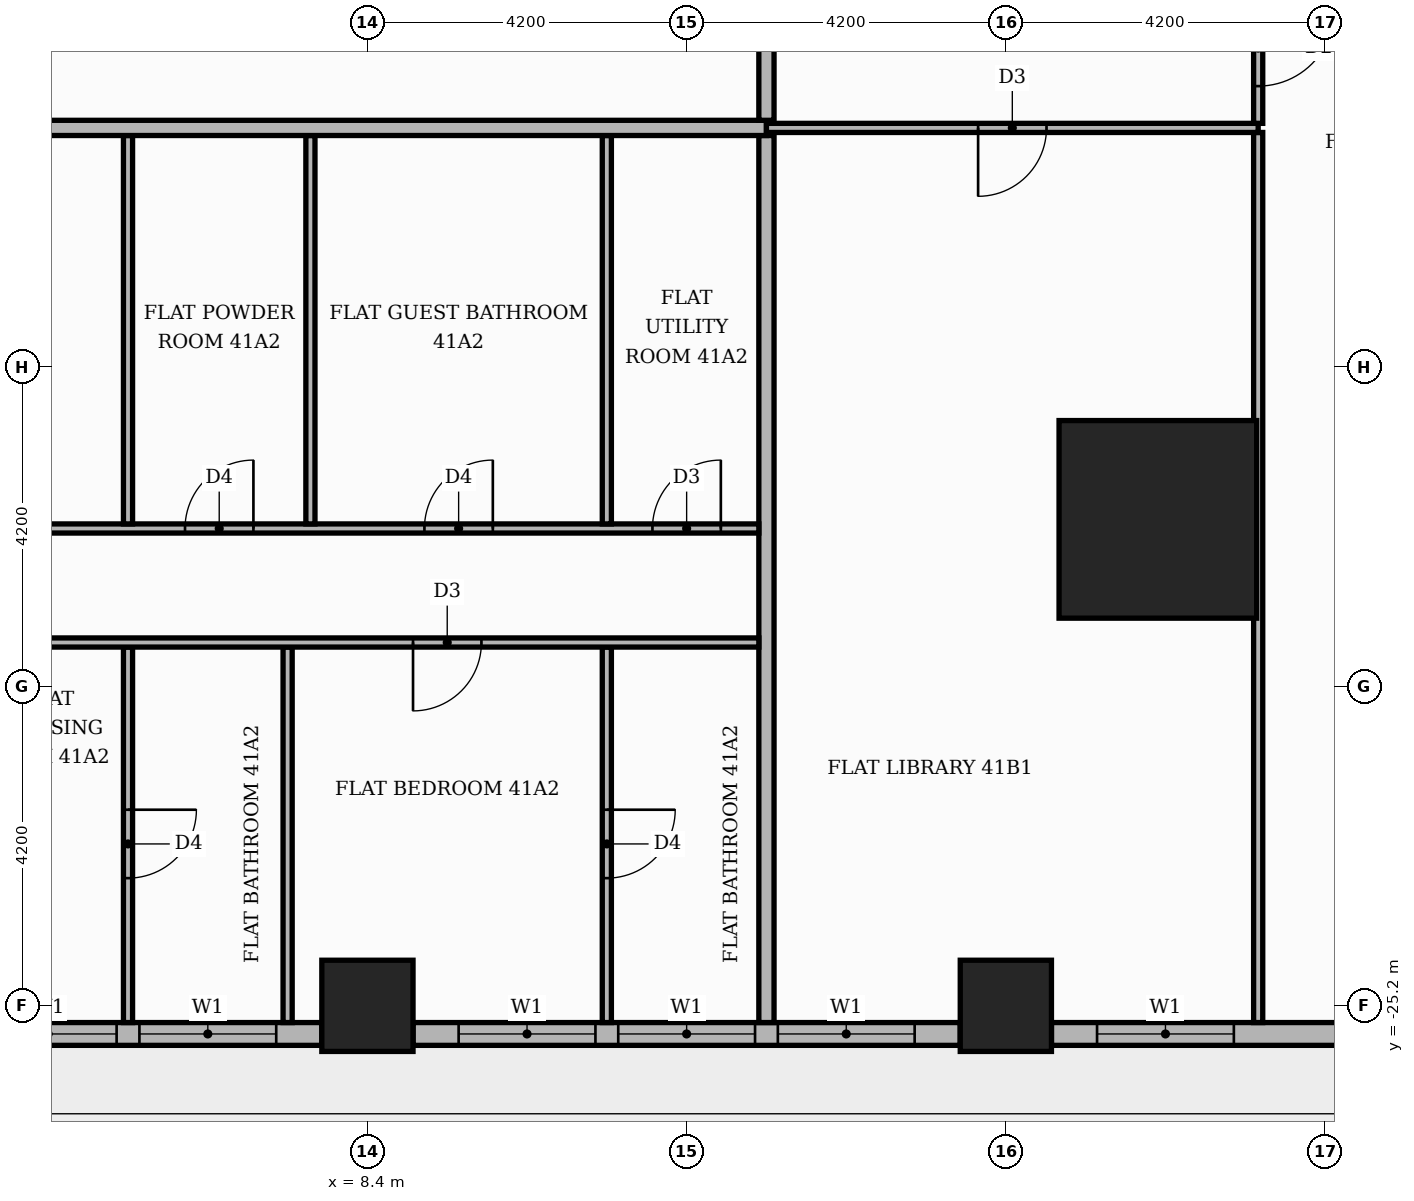
"""IFC4 building model, lengths in metres.
Left out: names, types, materials, properties, quantities, classifications, styles, units other than length and angle.
Written with IfcOpenShell. Run it as: python <this file> out.ifc"""

import sys

from ifc_helpers import new_model, si_unit, direction, frame, frame_2d, origin, origin_2d, place, context, subcontext, project, spatial, rectangle, extrude, element, fill, save


model = new_model("IFC4")
c1 = context("Model", 3, precision=1e-05, world=origin(), true_north=direction((0.0, 1.0)))
c2 = subcontext(c1, "Body", "Model", "MODEL_VIEW")
j1 = project(units=[si_unit("LENGTHUNIT", "METRE"), si_unit("PLANEANGLEUNIT", "RADIAN")], contexts=[c1])
p1 = place(None, origin())
s1 = spatial("IfcSite", under=j1, at=p1, CompositionType="ELEMENT")
p2 = place(p1, origin())
s2 = spatial("IfcBuilding", under=s1, at=p2, CompositionType="ELEMENT")
p3 = place(p2, frame((0.0, 0.0, 172.8)))
s3 = spatial("IfcBuildingStorey", under=s2, at=p3, CompositionType="ELEMENT", Elevation=172.8)
p4 = place(p3, frame((18.8, -18.8, 0.0), z_axis=(0.0, 0.0, 1.0), x_axis=(1.0, 0.0, 0.0)))
e1 = element("IfcColumn", 1, at=p4, inside=s3, PredefinedType="COLUMN", context=c2, shape_type="SweptSolid", body=[
    extrude(rectangle(XDim=2.6, YDim=2.6, at=origin_2d()), origin(), (0.0, 0.0, 1.0), 3.9),
])
for number, where, z_axis, x_axis in (
    (2, (8.4, -25.2, 0.0), (0.0, 0.0, 1.0), (1.0, 0.0, 0.0)),
    (3, (16.8, -25.2, 0.0), (0.0, 0.0, 1.0), (1.0, 0.0, 0.0)),
):
    element("IfcColumn", number, at=place(p3, frame(where, z_axis=z_axis, x_axis=x_axis)), inside=s3, PredefinedType="COLUMN", context=c2, shape_type="SweptSolid", body=[
        extrude(rectangle(XDim=1.2, YDim=1.2, at=origin_2d()), origin(), (0.0, 0.0, 1.0), 3.9),
    ])
p5 = place(p3, frame((0.6, -25.57, 0.0), z_axis=(0.0, 0.0, 1.0), x_axis=(1.0, 0.0, 0.0)))
e4 = element("IfcWall", 4, at=p5, inside=s3, PredefinedType="STANDARD", context=c2, shape_type="SweptSolid", body=[
    extrude(rectangle(XDim=7.2, YDim=0.3, at=frame_2d((3.6, 0.0))), origin(), (0.0, 0.0, 1.0), 3.48),
])
p6 = place(p5, frame((0.6, 0.0, 0.0)))
e5 = element("IfcOpeningElement", 5, at=p6, cuts=e4, PredefinedType="OPENING", context=c2, shape_type="SweptSolid", body=[
    extrude(rectangle(XDim=1.8, YDim=2.4, at=frame_2d((0.9, 1.2))), frame((0.0, 0.16, 0.0), z_axis=(0.0, -1.0, 0.0), x_axis=(1.0, 0.0, 0.0)), (0.0, 0.0, 1.0), 0.32),
])
p7 = place(p5, frame((2.7, 0.0, 0.9)))
e6 = element("IfcOpeningElement", 6, at=p7, cuts=e4, PredefinedType="OPENING", context=c2, shape_type="SweptSolid", body=[
    extrude(rectangle(XDim=1.8, YDim=2.1, at=frame_2d((0.9, 1.05))), frame((0.0, 0.16, 0.0), z_axis=(0.0, -1.0, 0.0), x_axis=(1.0, 0.0, 0.0)), (0.0, 0.0, 1.0), 0.32),
])
p8 = place(p5, frame((4.8, 0.0, 0.9)))
e7 = element("IfcOpeningElement", 7, at=p8, cuts=e4, PredefinedType="OPENING", context=c2, shape_type="SweptSolid", body=[
    extrude(rectangle(XDim=1.8, YDim=2.1, at=frame_2d((0.9, 1.05))), frame((0.0, 0.16, 0.0), z_axis=(0.0, -1.0, 0.0), x_axis=(1.0, 0.0, 0.0)), (0.0, 0.0, 1.0), 0.32),
])
p9 = place(p3, frame((9.0, -25.57, 0.0), z_axis=(0.0, 0.0, 1.0), x_axis=(1.0, 0.0, 0.0)))
e8 = element("IfcWall", 8, at=p9, inside=s3, PredefinedType="STANDARD", context=c2, shape_type="SweptSolid", body=[
    extrude(rectangle(XDim=7.2, YDim=0.3, at=frame_2d((3.6, 0.0))), origin(), (0.0, 0.0, 1.0), 3.48),
])
p10 = place(p9, frame((0.6, 0.0, 0.9)))
e9 = element("IfcOpeningElement", 9, at=p10, cuts=e8, PredefinedType="OPENING", context=c2, shape_type="SweptSolid", body=[
    extrude(rectangle(XDim=1.8, YDim=2.1, at=frame_2d((0.9, 1.05))), frame((0.0, 0.16, 0.0), z_axis=(0.0, -1.0, 0.0), x_axis=(1.0, 0.0, 0.0)), (0.0, 0.0, 1.0), 0.32),
])
p11 = place(p9, frame((2.7, 0.0, 0.9)))
e10 = element("IfcOpeningElement", 10, at=p11, cuts=e8, PredefinedType="OPENING", context=c2, shape_type="SweptSolid", body=[
    extrude(rectangle(XDim=1.8, YDim=2.1, at=frame_2d((0.9, 1.05))), frame((0.0, 0.16, 0.0), z_axis=(0.0, -1.0, 0.0), x_axis=(1.0, 0.0, 0.0)), (0.0, 0.0, 1.0), 0.32),
])
p12 = place(p9, frame((4.8, 0.0, 0.9)))
e11 = element("IfcOpeningElement", 11, at=p12, cuts=e8, PredefinedType="OPENING", context=c2, shape_type="SweptSolid", body=[
    extrude(rectangle(XDim=1.8, YDim=2.1, at=frame_2d((0.9, 1.05))), frame((0.0, 0.16, 0.0), z_axis=(0.0, -1.0, 0.0), x_axis=(1.0, 0.0, 0.0)), (0.0, 0.0, 1.0), 0.32),
])
p13 = place(p3, frame((17.4, -25.57, 0.0), z_axis=(0.0, 0.0, 1.0), x_axis=(1.0, 0.0, 0.0)))
e12 = element("IfcWall", 12, at=p13, inside=s3, PredefinedType="STANDARD", context=c2, shape_type="SweptSolid", body=[
    extrude(rectangle(XDim=4.32, YDim=0.3, at=frame_2d((2.16, 0.0))), origin(), (0.0, 0.0, 1.0), 3.48),
])
p14 = place(p13, frame((0.6, 0.0, 0.9)))
e13 = element("IfcOpeningElement", 13, at=p14, cuts=e12, PredefinedType="OPENING", context=c2, shape_type="SweptSolid", body=[
    extrude(rectangle(XDim=1.8, YDim=2.1, at=frame_2d((0.9, 1.05))), frame((0.0, 0.16, 0.0), z_axis=(0.0, -1.0, 0.0), x_axis=(1.0, 0.0, 0.0)), (0.0, 0.0, 1.0), 0.32),
])
p15 = place(p3, frame((5.25, -25.42, 0.0), z_axis=(0.0, 0.0, 1.0), x_axis=(0.0, 1.0, 0.0)))
e14 = element("IfcWall", 14, at=p15, inside=s3, PredefinedType="PARTITIONING", context=c2, shape_type="SweptSolid", body=[
    extrude(rectangle(XDim=4.94, YDim=0.12, at=frame_2d((2.47, 0.0))), origin(), (0.0, 0.0, 1.0), 3.48),
])
p16 = place(p15, frame((1.9, 0.0, 0.0)))
e15 = element("IfcOpeningElement", 15, at=p16, cuts=e14, PredefinedType="OPENING", context=c2, shape_type="SweptSolid", body=[
    extrude(rectangle(XDim=0.9, YDim=2.1, at=frame_2d((0.45, 1.05))), frame((0.0, 0.07, 0.0), z_axis=(0.0, -1.0, 0.0), x_axis=(1.0, 0.0, 0.0)), (0.0, 0.0, 1.0), 0.14),
])
p17 = place(p3, frame((7.35, -25.42, 0.0), z_axis=(0.0, 0.0, 1.0), x_axis=(0.0, 1.0, 0.0)))
e16 = element("IfcWall", 16, at=p17, inside=s3, PredefinedType="PARTITIONING", context=c2, shape_type="SweptSolid", body=[
    extrude(rectangle(XDim=4.94, YDim=0.12, at=frame_2d((2.47, 0.0))), origin(), (0.0, 0.0, 1.0), 3.48),
])
p18 = place(p3, frame((11.55, -25.42, 0.0), z_axis=(0.0, 0.0, 1.0), x_axis=(0.0, 1.0, 0.0)))
e17 = element("IfcWall", 17, at=p18, inside=s3, PredefinedType="PARTITIONING", context=c2, shape_type="SweptSolid", body=[
    extrude(rectangle(XDim=4.94, YDim=0.12, at=frame_2d((2.47, 0.0))), origin(), (0.0, 0.0, 1.0), 3.48),
])
p19 = place(p18, frame((1.9, 0.0, 0.0)))
e18 = element("IfcOpeningElement", 18, at=p19, cuts=e17, PredefinedType="OPENING", context=c2, shape_type="SweptSolid", body=[
    extrude(rectangle(XDim=0.9, YDim=2.1, at=frame_2d((0.45, 1.05))), frame((0.0, 0.07, 0.0), z_axis=(0.0, -1.0, 0.0), x_axis=(1.0, 0.0, 0.0)), (0.0, 0.0, 1.0), 0.14),
])
p20 = place(p3, frame((13.65, -25.42, 0.0), z_axis=(0.0, 0.0, 1.0), x_axis=(0.0, 1.0, 0.0)))
e19 = element("IfcWall", 19, at=p20, inside=s3, PredefinedType="PARTITIONING", context=c2, shape_type="SweptSolid", body=[
    extrude(rectangle(XDim=11.67, YDim=0.2, at=frame_2d((5.835, 0.0))), origin(), (0.0, 0.0, 1.0), 3.48),
])
p21 = place(p3, frame((20.12, -25.42, 0.0), z_axis=(0.0, 0.0, 1.0), x_axis=(0.0, 1.0, 0.0)))
e20 = element("IfcWall", 20, at=p21, inside=s3, PredefinedType="PARTITIONING", context=c2, shape_type="SweptSolid", body=[
    extrude(rectangle(XDim=11.71, YDim=0.12, at=frame_2d((5.855, 0.0))), origin(), (0.0, 0.0, 1.0), 3.48),
])
p22 = place(p3, frame((-5.15, -20.42, 0.0), z_axis=(0.0, 0.0, 1.0), x_axis=(1.0, 0.0, 0.0)))
e21 = element("IfcWall", 21, at=p22, inside=s3, PredefinedType="PARTITIONING", context=c2, shape_type="SweptSolid", body=[
    extrude(rectangle(XDim=18.7, YDim=0.12, at=frame_2d((9.35, 0.0))), origin(), (0.0, 0.0, 1.0), 3.48),
])
p23 = place(p22, frame((1.5, 0.0, 0.0)))
e22 = element("IfcOpeningElement", 22, at=p23, cuts=e21, PredefinedType="OPENING", context=c2, shape_type="SweptSolid", body=[
    extrude(rectangle(XDim=1.0, YDim=2.1, at=frame_2d((0.5, 1.05))), frame((0.0, 0.07, 0.0), z_axis=(0.0, -1.0, 0.0), x_axis=(1.0, 0.0, 0.0)), (0.0, 0.0, 1.0), 0.14),
])
p24 = place(p22, frame((5.75, 0.0, 0.0)))
e23 = element("IfcOpeningElement", 23, at=p24, cuts=e21, PredefinedType="OPENING", context=c2, shape_type="SweptSolid", body=[
    extrude(rectangle(XDim=0.9, YDim=2.1, at=frame_2d((0.45, 1.05))), frame((0.0, 0.07, 0.0), z_axis=(0.0, -1.0, 0.0), x_axis=(1.0, 0.0, 0.0)), (0.0, 0.0, 1.0), 0.14),
])
p25 = place(p22, frame((14.15, 0.0, 0.0)))
e24 = element("IfcOpeningElement", 24, at=p25, cuts=e21, PredefinedType="OPENING", context=c2, shape_type="SweptSolid", body=[
    extrude(rectangle(XDim=0.9, YDim=2.1, at=frame_2d((0.45, 1.05))), frame((0.0, 0.07, 0.0), z_axis=(0.0, -1.0, 0.0), x_axis=(1.0, 0.0, 0.0)), (0.0, 0.0, 1.0), 0.14),
])
p26 = place(p3, frame((-1.05, -18.92, 0.0), z_axis=(0.0, 0.0, 1.0), x_axis=(1.0, 0.0, 0.0)))
e25 = element("IfcWall", 25, at=p26, inside=s3, PredefinedType="PARTITIONING", context=c2, shape_type="SweptSolid", body=[
    extrude(rectangle(XDim=14.6, YDim=0.12, at=frame_2d((7.3, 0.0))), origin(), (0.0, 0.0, 1.0), 3.48),
])
p27 = place(p26, frame((2.7, 0.0, 0.0)))
e26 = element("IfcOpeningElement", 26, at=p27, cuts=e25, PredefinedType="OPENING", context=c2, shape_type="SweptSolid", body=[
    extrude(rectangle(XDim=0.9, YDim=2.1, at=frame_2d((0.45, 1.05))), frame((0.0, 0.07, 0.0), z_axis=(0.0, -1.0, 0.0), x_axis=(1.0, 0.0, 0.0)), (0.0, 0.0, 1.0), 0.14),
])
p28 = place(p26, frame((7.05, 0.0, 0.0)))
e27 = element("IfcOpeningElement", 27, at=p28, cuts=e25, PredefinedType="OPENING", context=c2, shape_type="SweptSolid", body=[
    extrude(rectangle(XDim=0.9, YDim=2.1, at=frame_2d((0.45, 1.05))), frame((0.0, 0.07, 0.0), z_axis=(0.0, -1.0, 0.0), x_axis=(1.0, 0.0, 0.0)), (0.0, 0.0, 1.0), 0.14),
])
p29 = place(p26, frame((10.2, 0.0, 0.0)))
e28 = element("IfcOpeningElement", 28, at=p29, cuts=e25, PredefinedType="OPENING", context=c2, shape_type="SweptSolid", body=[
    extrude(rectangle(XDim=0.9, YDim=2.1, at=frame_2d((0.45, 1.05))), frame((0.0, 0.07, 0.0), z_axis=(0.0, -1.0, 0.0), x_axis=(1.0, 0.0, 0.0)), (0.0, 0.0, 1.0), 0.14),
])
p30 = place(p26, frame((13.2, 0.0, 0.0)))
e29 = element("IfcOpeningElement", 29, at=p30, cuts=e25, PredefinedType="OPENING", context=c2, shape_type="SweptSolid", body=[
    extrude(rectangle(XDim=0.9, YDim=2.1, at=frame_2d((0.45, 1.05))), frame((0.0, 0.07, 0.0), z_axis=(0.0, -1.0, 0.0), x_axis=(1.0, 0.0, 0.0)), (0.0, 0.0, 1.0), 0.14),
])
for number, where, z_axis, x_axis in (
    (30, (5.25, -18.86, 0.0), (0.0, 0.0, 1.0), (0.0, 1.0, 0.0)),
    (31, (7.65, -18.86, 0.0), (0.0, 0.0, 1.0), (0.0, 1.0, 0.0)),
    (32, (11.55, -18.86, 0.0), (0.0, 0.0, 1.0), (0.0, 1.0, 0.0)),
):
    element("IfcWall", number, at=place(p3, frame(where, z_axis=z_axis, x_axis=x_axis)), inside=s3, PredefinedType="PARTITIONING", context=c2, shape_type="SweptSolid", body=[
        extrude(rectangle(XDim=5.11, YDim=0.12, at=frame_2d((2.555, 0.0))), origin(), (0.0, 0.0, 1.0), 3.48),
    ])
p31 = place(p3, frame((-25.42, -13.65, 0.0), z_axis=(0.0, 0.0, 1.0), x_axis=(1.0, 0.0, 0.0)))
e33 = element("IfcWall", 33, at=p31, inside=s3, PredefinedType="PARTITIONING", context=c2, shape_type="SweptSolid", body=[
    extrude(rectangle(XDim=39.07, YDim=0.2, at=frame_2d((19.535, 0.0))), origin(), (0.0, 0.0, 1.0), 3.48),
])
p32 = place(p31, frame((13.32, 0.0, 0.0)))
e34 = element("IfcOpeningElement", 34, at=p32, cuts=e33, PredefinedType="OPENING", context=c2, shape_type="SweptSolid", body=[
    extrude(rectangle(XDim=1.1, YDim=2.4, at=frame_2d((0.55, 1.2))), frame((0.0, 0.11, 0.0), z_axis=(0.0, -1.0, 0.0), x_axis=(1.0, 0.0, 0.0)), (0.0, 0.0, 1.0), 0.22),
])
p33 = place(p31, frame((21.72, 0.0, 0.0)))
e35 = element("IfcOpeningElement", 35, at=p33, cuts=e33, PredefinedType="OPENING", context=c2, shape_type="SweptSolid", body=[
    extrude(rectangle(XDim=1.1, YDim=2.4, at=frame_2d((0.55, 1.2))), frame((0.0, 0.11, 0.0), z_axis=(0.0, -1.0, 0.0), x_axis=(1.0, 0.0, 0.0)), (0.0, 0.0, 1.0), 0.22),
])
p34 = place(p3, frame((13.65, -13.65, 0.0), z_axis=(0.0, 0.0, 1.0), x_axis=(1.0, 0.0, 0.0)))
e36 = element("IfcWall", 36, at=p34, inside=s3, PredefinedType="PARTITIONING", context=c2, shape_type="SweptSolid", body=[
    extrude(rectangle(XDim=6.47, YDim=0.12, at=frame_2d((3.235, 0.0))), origin(), (0.0, 0.0, 1.0), 3.48),
])
p35 = place(p34, frame((2.785, 0.0, 0.0)))
e37 = element("IfcOpeningElement", 37, at=p35, cuts=e36, PredefinedType="OPENING", context=c2, shape_type="SweptSolid", body=[
    extrude(rectangle(XDim=0.9, YDim=2.1, at=frame_2d((0.45, 1.05))), frame((0.0, 0.07, 0.0), z_axis=(0.0, -1.0, 0.0), x_axis=(1.0, 0.0, 0.0)), (0.0, 0.0, 1.0), 0.14),
])
p36 = place(p3, frame((20.12, -13.59, 0.0), z_axis=(0.0, 0.0, 1.0), x_axis=(0.0, 1.0, 0.0)))
e38 = element("IfcWall", 38, at=p36, inside=s3, PredefinedType="PARTITIONING", context=c2, shape_type="SweptSolid", body=[
    extrude(rectangle(XDim=1.98, YDim=0.12, at=frame_2d((0.99, 0.0))), origin(), (0.0, 0.0, 1.0), 3.48),
])
p37 = place(p36, frame((0.49, 0.0, 0.0)))
e39 = element("IfcOpeningElement", 39, at=p37, cuts=e38, PredefinedType="OPENING", context=c2, shape_type="SweptSolid", body=[
    extrude(rectangle(XDim=1.0, YDim=2.1, at=frame_2d((0.5, 1.05))), frame((0.0, 0.07, 0.0), z_axis=(0.0, -1.0, 0.0), x_axis=(1.0, 0.0, 0.0)), (0.0, 0.0, 1.0), 0.14),
])
p38 = place(p3, frame((13.65, -13.55, 0.0), z_axis=(0.0, 0.0, 1.0), x_axis=(0.0, 1.0, 0.0)))
e40 = element("IfcWall", 40, at=p38, inside=s3, PredefinedType="PARTITIONING", context=c2, shape_type="SweptSolid", body=[
    extrude(rectangle(XDim=2.45, YDim=0.2, at=frame_2d((1.225, 0.0))), origin(), (0.0, 0.0, 1.0), 3.48),
])
p39 = place(p7, origin())
e41 = element("IfcWindow", 41, at=p39, inside=s3, PartitioningType="SINGLE_PANEL", PredefinedType="WINDOW", context=c2, shape_type="SweptSolid", body=[
    extrude(rectangle(XDim=1.8, YDim=2.1, at=frame_2d((0.9, 1.05))), frame((0.0, 0.03, 0.0), z_axis=(0.0, -1.0, 0.0), x_axis=(1.0, 0.0, 0.0)), (0.0, 0.0, 1.0), 0.06),
])
fill(e6, e41)
p40 = place(p8, origin())
e42 = element("IfcWindow", 42, at=p40, inside=s3, PartitioningType="SINGLE_PANEL", PredefinedType="WINDOW", context=c2, shape_type="SweptSolid", body=[
    extrude(rectangle(XDim=1.8, YDim=2.1, at=frame_2d((0.9, 1.05))), frame((0.0, 0.03, 0.0), z_axis=(0.0, -1.0, 0.0), x_axis=(1.0, 0.0, 0.0)), (0.0, 0.0, 1.0), 0.06),
])
fill(e7, e42)
p41 = place(p10, origin())
e43 = element("IfcWindow", 43, at=p41, inside=s3, PartitioningType="SINGLE_PANEL", PredefinedType="WINDOW", context=c2, shape_type="SweptSolid", body=[
    extrude(rectangle(XDim=1.8, YDim=2.1, at=frame_2d((0.9, 1.05))), frame((0.0, 0.03, 0.0), z_axis=(0.0, -1.0, 0.0), x_axis=(1.0, 0.0, 0.0)), (0.0, 0.0, 1.0), 0.06),
])
fill(e9, e43)
p42 = place(p11, origin())
e44 = element("IfcWindow", 44, at=p42, inside=s3, PartitioningType="SINGLE_PANEL", PredefinedType="WINDOW", context=c2, shape_type="SweptSolid", body=[
    extrude(rectangle(XDim=1.8, YDim=2.1, at=frame_2d((0.9, 1.05))), frame((0.0, 0.03, 0.0), z_axis=(0.0, -1.0, 0.0), x_axis=(1.0, 0.0, 0.0)), (0.0, 0.0, 1.0), 0.06),
])
fill(e10, e44)
p43 = place(p12, origin())
e45 = element("IfcWindow", 45, at=p43, inside=s3, PartitioningType="SINGLE_PANEL", PredefinedType="WINDOW", context=c2, shape_type="SweptSolid", body=[
    extrude(rectangle(XDim=1.8, YDim=2.1, at=frame_2d((0.9, 1.05))), frame((0.0, 0.03, 0.0), z_axis=(0.0, -1.0, 0.0), x_axis=(1.0, 0.0, 0.0)), (0.0, 0.0, 1.0), 0.06),
])
fill(e11, e45)
p44 = place(p14, origin())
e46 = element("IfcWindow", 46, at=p44, inside=s3, PartitioningType="SINGLE_PANEL", PredefinedType="WINDOW", context=c2, shape_type="SweptSolid", body=[
    extrude(rectangle(XDim=1.8, YDim=2.1, at=frame_2d((0.9, 1.05))), frame((0.0, 0.03, 0.0), z_axis=(0.0, -1.0, 0.0), x_axis=(1.0, 0.0, 0.0)), (0.0, 0.0, 1.0), 0.06),
])
fill(e13, e46)
p45 = place(p28, origin())
e47 = element("IfcDoor", 47, at=p45, inside=s3, OperationType="SINGLE_SWING_RIGHT", PredefinedType="DOOR", context=c2, shape_type="SweptSolid", body=[
    extrude(rectangle(XDim=0.9, YDim=2.1, at=frame_2d((0.45, 1.05))), frame((0.0, 0.025, 0.0), z_axis=(0.0, -1.0, 0.0), x_axis=(1.0, 0.0, 0.0)), (0.0, 0.0, 1.0), 0.05),
])
fill(e27, e47)
p46 = place(p29, origin())
e48 = element("IfcDoor", 48, at=p46, inside=s3, OperationType="SINGLE_SWING_RIGHT", PredefinedType="DOOR", context=c2, shape_type="SweptSolid", body=[
    extrude(rectangle(XDim=0.9, YDim=2.1, at=frame_2d((0.45, 1.05))), frame((0.0, 0.025, 0.0), z_axis=(0.0, -1.0, 0.0), x_axis=(1.0, 0.0, 0.0)), (0.0, 0.0, 1.0), 0.05),
])
fill(e28, e48)
p47 = place(p30, origin())
e49 = element("IfcDoor", 49, at=p47, inside=s3, OperationType="SINGLE_SWING_RIGHT", PredefinedType="DOOR", context=c2, shape_type="SweptSolid", body=[
    extrude(rectangle(XDim=0.9, YDim=2.1, at=frame_2d((0.45, 1.05))), frame((0.0, 0.025, 0.0), z_axis=(0.0, -1.0, 0.0), x_axis=(1.0, 0.0, 0.0)), (0.0, 0.0, 1.0), 0.05),
])
fill(e29, e49)
p48 = place(p16, frame((0.9, 0.0, 0.0), z_axis=(0.0, 0.0, 1.0), x_axis=(-1.0, 0.0, 0.0)))
e50 = element("IfcDoor", 50, at=p48, inside=s3, OperationType="SINGLE_SWING_RIGHT", PredefinedType="DOOR", context=c2, shape_type="SweptSolid", body=[
    extrude(rectangle(XDim=0.9, YDim=2.1, at=frame_2d((0.45, 1.05))), frame((0.0, 0.025, 0.0), z_axis=(0.0, -1.0, 0.0), x_axis=(1.0, 0.0, 0.0)), (0.0, 0.0, 1.0), 0.05),
])
fill(e15, e50)
p49 = place(p25, frame((0.9, 0.0, 0.0), z_axis=(0.0, 0.0, 1.0), x_axis=(-1.0, 0.0, 0.0)))
e51 = element("IfcDoor", 51, at=p49, inside=s3, OperationType="SINGLE_SWING_LEFT", PredefinedType="DOOR", context=c2, shape_type="SweptSolid", body=[
    extrude(rectangle(XDim=0.9, YDim=2.1, at=frame_2d((0.45, 1.05))), frame((0.0, 0.025, 0.0), z_axis=(0.0, -1.0, 0.0), x_axis=(1.0, 0.0, 0.0)), (0.0, 0.0, 1.0), 0.05),
])
fill(e24, e51)
p50 = place(p19, frame((0.9, 0.0, 0.0), z_axis=(0.0, 0.0, 1.0), x_axis=(-1.0, 0.0, 0.0)))
e52 = element("IfcDoor", 52, at=p50, inside=s3, OperationType="SINGLE_SWING_RIGHT", PredefinedType="DOOR", context=c2, shape_type="SweptSolid", body=[
    extrude(rectangle(XDim=0.9, YDim=2.1, at=frame_2d((0.45, 1.05))), frame((0.0, 0.025, 0.0), z_axis=(0.0, -1.0, 0.0), x_axis=(1.0, 0.0, 0.0)), (0.0, 0.0, 1.0), 0.05),
])
fill(e18, e52)
p51 = place(p35, frame((0.9, 0.0, 0.0), z_axis=(0.0, 0.0, 1.0), x_axis=(-1.0, 0.0, 0.0)))
e53 = element("IfcDoor", 53, at=p51, inside=s3, OperationType="SINGLE_SWING_LEFT", PredefinedType="DOOR", context=c2, shape_type="SweptSolid", body=[
    extrude(rectangle(XDim=0.9, YDim=2.1, at=frame_2d((0.45, 1.05))), frame((0.0, 0.025, 0.0), z_axis=(0.0, -1.0, 0.0), x_axis=(1.0, 0.0, 0.0)), (0.0, 0.0, 1.0), 0.05),
])
fill(e37, e53)
p52 = place(p37, frame((1.0, 0.0, 0.0), z_axis=(0.0, 0.0, 1.0), x_axis=(-1.0, 0.0, 0.0)))
e54 = element("IfcDoor", 54, at=p52, inside=s3, OperationType="SINGLE_SWING_RIGHT", PredefinedType="DOOR", context=c2, shape_type="SweptSolid", body=[
    extrude(rectangle(XDim=1.0, YDim=2.1, at=frame_2d((0.5, 1.05))), frame((0.0, 0.025, 0.0), z_axis=(0.0, -1.0, 0.0), x_axis=(1.0, 0.0, 0.0)), (0.0, 0.0, 1.0), 0.05),
])
fill(e39, e54)
save(model, sys.argv[1])
